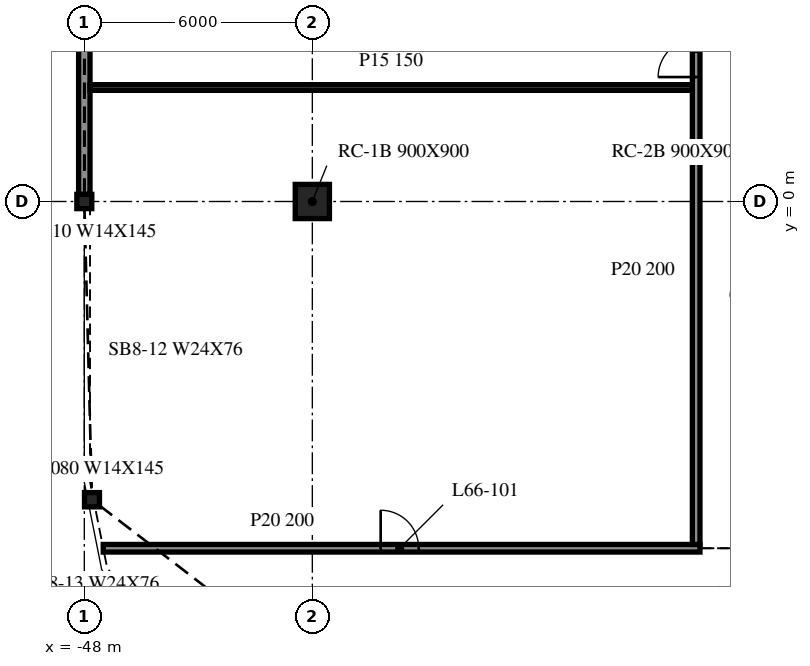
"""IFC4 building model, lengths in metres.
Left out: names, types, materials, properties, quantities, classifications, styles, units other than length and angle.
Written with IfcOpenShell. Run it as: python <this file> out.ifc"""

import sys

from ifc_helpers import new_model, si_unit, direction, frame, frame_2d, origin, origin_2d, place, context, subcontext, project, spatial, rectangle, i_section, extrude, element, fill, save


model = new_model("IFC4")
c1 = context("Model", 3, precision=1e-05, world=origin(), true_north=direction((0.0, 1.0)))
c2 = subcontext(c1, "Body", "Model", "MODEL_VIEW")
j1 = project(units=[si_unit("LENGTHUNIT", "METRE"), si_unit("PLANEANGLEUNIT", "RADIAN")], contexts=[c1])
p1 = place(None, origin())
s1 = spatial("IfcSite", under=j1, at=p1, CompositionType="ELEMENT")
p2 = place(p1, origin())
s2 = spatial("IfcBuilding", under=s1, at=p2, CompositionType="ELEMENT")
p3 = place(p2, frame((0.0, 0.0, 270.9)))
s3 = spatial("IfcBuildingStorey", under=s2, at=p3, CompositionType="ELEMENT", Elevation=270.9)
p4 = place(p3, frame((-42.0, 0.0, -0.34), z_axis=(0.0, 0.0, 1.0), x_axis=(1.0, 0.0, 0.0)))
e1 = element("IfcColumn", 1, at=p4, inside=s3, PredefinedType="COLUMN", context=c2, shape_type="SweptSolid", body=[
    extrude(rectangle(XDim=0.9, YDim=0.9, at=origin_2d()), origin(), (0.0, 0.0, 1.0), 3.8),
])
for number, where, z_axis, x_axis in (
    (2, (-48.0, 0.0, -0.34), (0.0, 0.0, 1.0), (1.0, 0.0, 0.0)),
    (3, (-47.798, -7.848, -0.34), (0.0, 0.0, 1.0), (1.0, 0.0, 0.0)),
):
    element("IfcColumn", number, at=place(p3, frame(where, z_axis=z_axis, x_axis=x_axis)), inside=s3, PredefinedType="COLUMN", context=c2, shape_type="SweptSolid", body=[
        extrude(i_section(OverallWidth=0.394, OverallDepth=0.376, WebThickness=0.017, FlangeThickness=0.028, at=origin_2d()), origin(), (0.0, 0.0, 1.0), 3.8),
    ])
p5 = place(p3, frame((-48.0, 11.312, 0.0), z_axis=(0.0, 0.0, 1.0), x_axis=(0.0, -1.0, 0.0)))
e4 = element("IfcWall", 4, at=p5, inside=s3, PredefinedType="NOTDEFINED", context=c2, shape_type="SweptSolid", body=[
    extrude(rectangle(XDim=11.124, YDim=0.3, at=frame_2d((5.562, 0.0))), origin(), (0.0, 0.0, 1.0), 2.853),
])
p6 = place(p3, frame((-47.502, -9.125, 0.0), z_axis=(0.0, 0.0, 1.0), x_axis=(1.0, 0.0, 0.0)))
e5 = element("IfcWall", 5, at=p6, inside=s3, PredefinedType="PARTITIONING", context=c2, shape_type="SweptSolid", body=[
    extrude(rectangle(XDim=15.702, YDim=0.2, at=frame_2d((7.851, 0.0))), origin(), (0.0, 0.0, 1.0), 3.46),
])
p7 = place(p6, frame((7.3, 0.0, 0.0)))
e6 = element("IfcOpeningElement", 6, at=p7, cuts=e5, PredefinedType="OPENING", context=c2, shape_type="SweptSolid", body=[
    extrude(rectangle(XDim=1.0, YDim=2.1, at=frame_2d((0.5, 1.05))), frame((0.0, 0.11, 0.0), z_axis=(0.0, -1.0, 0.0), x_axis=(1.0, 0.0, 0.0)), (0.0, 0.0, 1.0), 0.22),
])
p8 = place(p3, frame((-47.85, 3.0, 0.0), z_axis=(0.0, 0.0, 1.0), x_axis=(1.0, 0.0, 0.0)))
e7 = element("IfcWall", 7, at=p8, inside=s3, PredefinedType="PARTITIONING", context=c2, shape_type="SweptSolid", body=[
    extrude(rectangle(XDim=15.85, YDim=0.15, at=frame_2d((7.925, 0.0))), origin(), (0.0, 0.0, 1.0), 3.46),
])
p9 = place(p3, frame((-31.9, -9.025, 0.0), z_axis=(0.0, 0.0, 1.0), x_axis=(0.0, 1.0, 0.0)))
e8 = element("IfcWall", 8, at=p9, inside=s3, PredefinedType="PARTITIONING", context=c2, shape_type="SweptSolid", body=[
    extrude(rectangle(XDim=24.05, YDim=0.2, at=frame_2d((12.025, 0.0))), origin(), (0.0, 0.0, 1.0), 3.46),
])
p10 = place(p9, frame((12.3, 0.0, 0.0)))
e9 = element("IfcOpeningElement", 9, at=p10, cuts=e8, PredefinedType="OPENING", context=c2, shape_type="SweptSolid", body=[
    extrude(rectangle(XDim=1.0, YDim=2.1, at=frame_2d((0.5, 1.05))), frame((0.0, 0.11, 0.0), z_axis=(0.0, -1.0, 0.0), x_axis=(1.0, 0.0, 0.0)), (0.0, 0.0, 1.0), 0.22),
])
p11 = place(p7, origin())
e10 = element("IfcDoor", 10, at=p11, inside=s3, OperationType="SINGLE_SWING_LEFT", PredefinedType="DOOR", context=c2, shape_type="SweptSolid", body=[
    extrude(rectangle(XDim=1.0, YDim=2.1, at=frame_2d((0.5, 1.05))), frame((0.0, 0.025, 0.0), z_axis=(0.0, -1.0, 0.0), x_axis=(1.0, 0.0, 0.0)), (0.0, 0.0, 1.0), 0.05),
])
fill(e6, e10)
p12 = place(p10, origin())
e11 = element("IfcDoor", 11, at=p12, inside=s3, OperationType="SINGLE_SWING_RIGHT", PredefinedType="DOOR", context=c2, shape_type="SweptSolid", body=[
    extrude(rectangle(XDim=1.0, YDim=2.1, at=frame_2d((0.5, 1.05))), frame((0.0, 0.025, 0.0), z_axis=(0.0, -1.0, 0.0), x_axis=(1.0, 0.0, 0.0)), (0.0, 0.0, 1.0), 0.05),
])
fill(e9, e11)
save(model, sys.argv[1])
